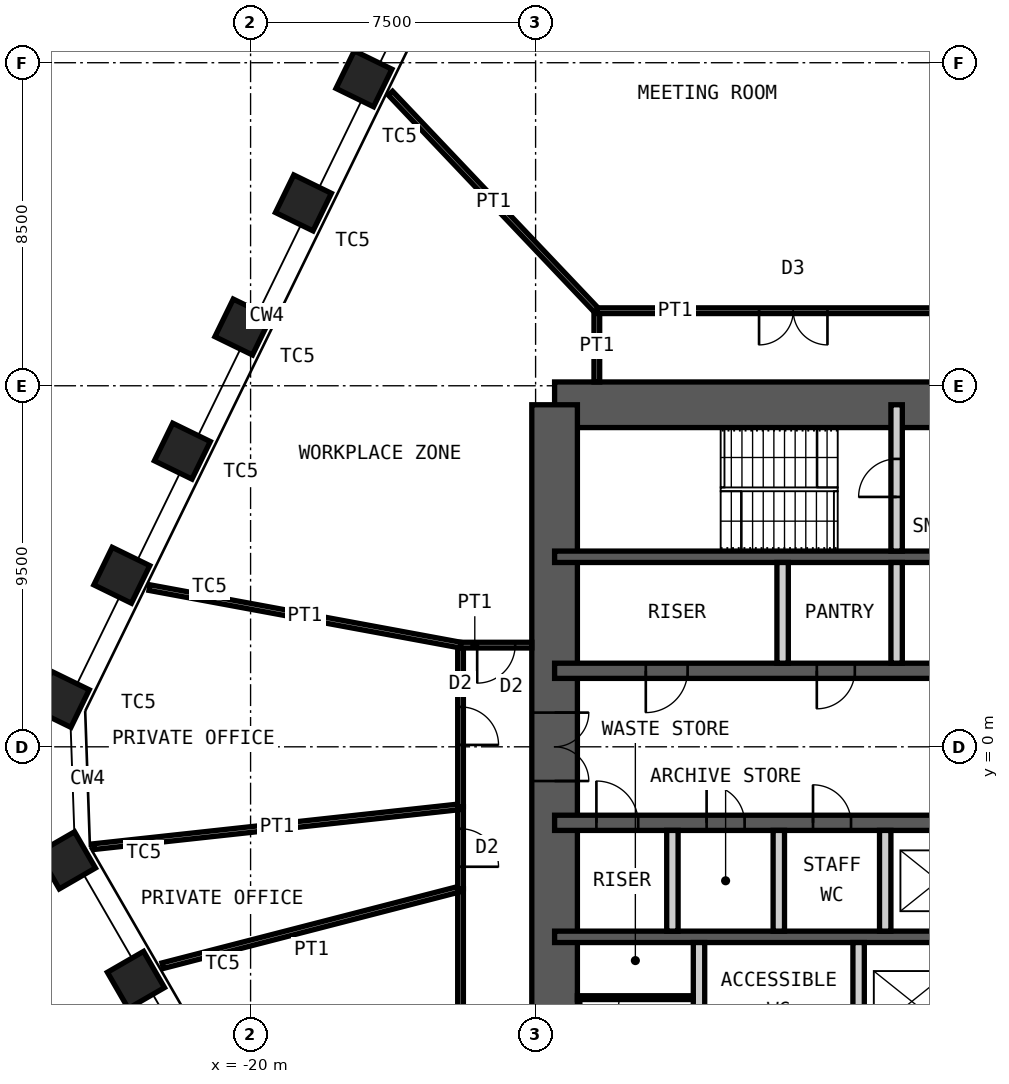
"""IFC4 building model, lengths in metres.
Left out: names, types, materials, properties, quantities, classifications, styles, units other than length and angle.
Written with IfcOpenShell. Run it as: python <this file> out.ifc"""

import sys

from ifc_helpers import new_model, si_unit, direction, frame, frame_2d, origin, origin_2d, place, context, subcontext, project, spatial, rectangle, hollow_rectangle, extrude, element, fill, save


model = new_model("IFC4")
c1 = context("Model", 3, precision=1e-05, world=origin(), true_north=direction((0.0, 1.0)))
c2 = subcontext(c1, "Body", "Model", "MODEL_VIEW")
j1 = project(units=[si_unit("LENGTHUNIT", "METRE"), si_unit("PLANEANGLEUNIT", "RADIAN")], contexts=[c1])
p1 = place(None, origin())
s1 = spatial("IfcSite", under=j1, at=p1, CompositionType="ELEMENT")
p2 = place(p1, origin())
s2 = spatial("IfcBuilding", under=s1, at=p2, CompositionType="ELEMENT")
p3 = place(p2, frame((0.0, 0.0, 214.0)))
s3 = spatial("IfcBuildingStorey", under=s2, at=p3, CompositionType="ELEMENT", Elevation=214.0)
for number, where, z_axis, x_axis in (
    (1, (-23.016, -6.134, 0.0), (0.0, 0.0, 1.0), (0.5, -0.866, 0.0)),
    (2, (-24.833, -2.988, 0.0), (0.0, 0.0, 1.0), (0.5, -0.866, 0.0)),
    (3, (-24.981, 1.248, 0.0), (0.0, 0.0, 1.0), (-0.438, -0.899, 0.0)),
    (4, (-23.388, 4.514, 0.0), (0.0, 0.0, 1.0), (-0.438, -0.899, 0.0)),
    (5, (-21.795, 7.78, 0.0), (0.0, 0.0, 1.0), (-0.438, -0.899, 0.0)),
    (6, (-20.203, 11.045, 0.0), (0.0, 0.0, 1.0), (-0.438, -0.899, 0.0)),
    (7, (-18.61, 14.311, 0.0), (0.0, 0.0, 1.0), (-0.438, -0.899, 0.0)),
    (8, (-17.017, 17.577, 0.0), (0.0, 0.0, 1.0), (-0.438, -0.899, 0.0)),
):
    element("IfcColumn", number, at=place(p3, frame(where, z_axis=z_axis, x_axis=x_axis)), inside=s3, PredefinedType="COLUMN", context=c2, shape_type="SweptSolid", body=[
        extrude(hollow_rectangle(XDim=1.1, YDim=1.1, WallThickness=0.07, at=origin_2d()), origin(), (0.0, 0.0, 1.0), 4.2),
    ])
p4 = place(p3, frame((-12.0, 9.0, 0.0), z_axis=(0.0, 0.0, 1.0), x_axis=(1.0, 0.0, 0.0)))
e9 = element("IfcWall", 9, at=p4, inside=s3, PredefinedType="SHEAR", context=c2, shape_type="SweptSolid", body=[
    extrude(rectangle(XDim=24.0, YDim=1.2, at=frame_2d((12.0, 0.0))), origin(), (0.0, 0.0, 1.0), 4.2),
])
p5 = place(p4, frame((10.4, 0.0, 0.0)))
e10 = element("IfcOpeningElement", 10, at=p5, cuts=e9, PredefinedType="OPENING", context=c2, shape_type="SweptSolid", body=[
    extrude(rectangle(XDim=1.0, YDim=2.1, at=frame_2d((0.5, 1.05))), frame((0.0, 0.61, 0.0), z_axis=(0.0, -1.0, 0.0), x_axis=(1.0, 0.0, 0.0)), (0.0, 0.0, 1.0), 1.22),
])
p6 = place(p4, frame((17.6, 0.0, 0.0)))
e11 = element("IfcOpeningElement", 11, at=p6, cuts=e9, PredefinedType="OPENING", context=c2, shape_type="SweptSolid", body=[
    extrude(rectangle(XDim=0.9, YDim=2.1, at=frame_2d((0.45, 1.05))), frame((0.0, 0.61, 0.0), z_axis=(0.0, -1.0, 0.0), x_axis=(1.0, 0.0, 0.0)), (0.0, 0.0, 1.0), 1.22),
])
p7 = place(p4, frame((21.9, 0.0, 0.0)))
e12 = element("IfcOpeningElement", 12, at=p7, cuts=e9, PredefinedType="OPENING", context=c2, shape_type="SweptSolid", body=[
    extrude(rectangle(XDim=0.9, YDim=2.1, at=frame_2d((0.45, 1.05))), frame((0.0, 0.61, 0.0), z_axis=(0.0, -1.0, 0.0), x_axis=(1.0, 0.0, 0.0)), (0.0, 0.0, 1.0), 1.22),
])
p8 = place(p3, frame((-12.0, -9.0, 0.0), z_axis=(0.0, 0.0, 1.0), x_axis=(0.0, 1.0, 0.0)))
e13 = element("IfcWall", 13, at=p8, inside=s3, PredefinedType="SHEAR", context=c2, shape_type="SweptSolid", body=[
    extrude(rectangle(XDim=18.0, YDim=1.2, at=frame_2d((9.0, 0.0))), origin(), (0.0, 0.0, 1.0), 4.2),
])
p9 = place(p8, frame((8.1, 0.0, 0.0)))
e14 = element("IfcOpeningElement", 14, at=p9, cuts=e13, PredefinedType="OPENING", context=c2, shape_type="SweptSolid", body=[
    extrude(rectangle(XDim=1.8, YDim=2.1, at=frame_2d((0.9, 1.05))), frame((0.0, 0.61, 0.0), z_axis=(0.0, -1.0, 0.0), x_axis=(1.0, 0.0, 0.0)), (0.0, 0.0, 1.0), 1.22),
])
p10 = place(p3, frame((-12.0, 5.0, 0.0), z_axis=(0.0, 0.0, 1.0), x_axis=(1.0, 0.0, 0.0)))
e15 = element("IfcWall", 15, at=p10, inside=s3, PredefinedType="SHEAR", context=c2, shape_type="SweptSolid", body=[
    extrude(rectangle(XDim=24.0, YDim=0.3, at=frame_2d((12.0, 0.0))), origin(), (0.0, 0.0, 1.0), 4.2),
])
p11 = place(p3, frame((-12.0, 2.0, 0.0), z_axis=(0.0, 0.0, 1.0), x_axis=(1.0, 0.0, 0.0)))
e16 = element("IfcWall", 16, at=p11, inside=s3, PredefinedType="SHEAR", context=c2, shape_type="SweptSolid", body=[
    extrude(rectangle(XDim=24.0, YDim=0.4, at=frame_2d((12.0, 0.0))), origin(), (0.0, 0.0, 1.0), 4.2),
])
p12 = place(p11, frame((2.4, 0.0, 0.0)))
e17 = element("IfcOpeningElement", 17, at=p12, cuts=e16, PredefinedType="OPENING", context=c2, shape_type="SweptSolid", body=[
    extrude(rectangle(XDim=1.1, YDim=2.1, at=frame_2d((0.55, 1.05))), frame((0.0, 0.21, 0.0), z_axis=(0.0, -1.0, 0.0), x_axis=(1.0, 0.0, 0.0)), (0.0, 0.0, 1.0), 0.42),
])
p13 = place(p11, frame((22.0, 0.0, 0.0)))
e18 = element("IfcOpeningElement", 18, at=p13, cuts=e16, PredefinedType="OPENING", context=c2, shape_type="SweptSolid", body=[
    extrude(rectangle(XDim=1.1, YDim=2.1, at=frame_2d((0.55, 1.05))), frame((0.0, 0.21, 0.0), z_axis=(0.0, -1.0, 0.0), x_axis=(1.0, 0.0, 0.0)), (0.0, 0.0, 1.0), 0.42),
])
p14 = place(p11, frame((10.15, 0.0, 0.0)))
e19 = element("IfcOpeningElement", 19, at=p14, cuts=e16, PredefinedType="OPENING", context=c2, shape_type="SweptSolid", body=[
    extrude(rectangle(XDim=1.0, YDim=2.1, at=frame_2d((0.5, 1.05))), frame((0.0, 0.21, 0.0), z_axis=(0.0, -1.0, 0.0), x_axis=(1.0, 0.0, 0.0)), (0.0, 0.0, 1.0), 0.42),
])
p15 = place(p11, frame((6.9, 0.0, 0.0)))
e20 = element("IfcOpeningElement", 20, at=p15, cuts=e16, PredefinedType="OPENING", context=c2, shape_type="SweptSolid", body=[
    extrude(rectangle(XDim=1.0, YDim=2.1, at=frame_2d((0.5, 1.05))), frame((0.0, 0.21, 0.0), z_axis=(0.0, -1.0, 0.0), x_axis=(1.0, 0.0, 0.0)), (0.0, 0.0, 1.0), 0.42),
])
p16 = place(p11, frame((13.35, 0.0, 0.0)))
e21 = element("IfcOpeningElement", 21, at=p16, cuts=e16, PredefinedType="OPENING", context=c2, shape_type="SweptSolid", body=[
    extrude(rectangle(XDim=1.1, YDim=2.4, at=frame_2d((0.55, 1.2))), frame((0.0, 0.21, 0.0), z_axis=(0.0, -1.0, 0.0), x_axis=(1.0, 0.0, 0.0)), (0.0, 0.0, 1.0), 0.42),
])
p17 = place(p11, frame((16.15, 0.0, 0.0)))
e22 = element("IfcOpeningElement", 22, at=p17, cuts=e16, PredefinedType="OPENING", context=c2, shape_type="SweptSolid", body=[
    extrude(rectangle(XDim=1.1, YDim=2.4, at=frame_2d((0.55, 1.2))), frame((0.0, 0.21, 0.0), z_axis=(0.0, -1.0, 0.0), x_axis=(1.0, 0.0, 0.0)), (0.0, 0.0, 1.0), 0.42),
])
p18 = place(p11, frame((18.95, 0.0, 0.0)))
e23 = element("IfcOpeningElement", 23, at=p18, cuts=e16, PredefinedType="OPENING", context=c2, shape_type="SweptSolid", body=[
    extrude(rectangle(XDim=1.1, YDim=2.4, at=frame_2d((0.55, 1.2))), frame((0.0, 0.21, 0.0), z_axis=(0.0, -1.0, 0.0), x_axis=(1.0, 0.0, 0.0)), (0.0, 0.0, 1.0), 0.42),
])
p19 = place(p3, frame((-12.0, -2.0, 0.0), z_axis=(0.0, 0.0, 1.0), x_axis=(1.0, 0.0, 0.0)))
e24 = element("IfcWall", 24, at=p19, inside=s3, PredefinedType="SHEAR", context=c2, shape_type="SweptSolid", body=[
    extrude(rectangle(XDim=24.0, YDim=0.4, at=frame_2d((12.0, 0.0))), origin(), (0.0, 0.0, 1.0), 4.2),
])
p20 = place(p19, frame((1.1, 0.0, 0.0)))
e25 = element("IfcOpeningElement", 25, at=p20, cuts=e24, PredefinedType="OPENING", context=c2, shape_type="SweptSolid", body=[
    extrude(rectangle(XDim=1.1, YDim=2.1, at=frame_2d((0.55, 1.05))), frame((0.0, 0.21, 0.0), z_axis=(0.0, -1.0, 0.0), x_axis=(1.0, 0.0, 0.0)), (0.0, 0.0, 1.0), 0.42),
])
p21 = place(p19, frame((13.55, 0.0, 0.0)))
e26 = element("IfcOpeningElement", 26, at=p21, cuts=e24, PredefinedType="OPENING", context=c2, shape_type="SweptSolid", body=[
    extrude(rectangle(XDim=1.1, YDim=2.1, at=frame_2d((0.55, 1.05))), frame((0.0, 0.21, 0.0), z_axis=(0.0, -1.0, 0.0), x_axis=(1.0, 0.0, 0.0)), (0.0, 0.0, 1.0), 0.42),
])
p22 = place(p19, frame((20.7, 0.0, 0.0)))
e27 = element("IfcOpeningElement", 27, at=p22, cuts=e24, PredefinedType="OPENING", context=c2, shape_type="SweptSolid", body=[
    extrude(rectangle(XDim=1.1, YDim=2.1, at=frame_2d((0.55, 1.05))), frame((0.0, 0.21, 0.0), z_axis=(0.0, -1.0, 0.0), x_axis=(1.0, 0.0, 0.0)), (0.0, 0.0, 1.0), 0.42),
])
p23 = place(p19, frame((4.0, 0.0, 0.0)))
e28 = element("IfcOpeningElement", 28, at=p23, cuts=e24, PredefinedType="OPENING", context=c2, shape_type="SweptSolid", body=[
    extrude(rectangle(XDim=1.0, YDim=2.1, at=frame_2d((0.5, 1.05))), frame((0.0, 0.21, 0.0), z_axis=(0.0, -1.0, 0.0), x_axis=(1.0, 0.0, 0.0)), (0.0, 0.0, 1.0), 0.42),
])
p24 = place(p19, frame((6.8, 0.0, 0.0)))
e29 = element("IfcOpeningElement", 29, at=p24, cuts=e24, PredefinedType="OPENING", context=c2, shape_type="SweptSolid", body=[
    extrude(rectangle(XDim=1.0, YDim=2.1, at=frame_2d((0.5, 1.05))), frame((0.0, 0.21, 0.0), z_axis=(0.0, -1.0, 0.0), x_axis=(1.0, 0.0, 0.0)), (0.0, 0.0, 1.0), 0.42),
])
p25 = place(p3, frame((-12.0, -5.0, 0.0), z_axis=(0.0, 0.0, 1.0), x_axis=(1.0, 0.0, 0.0)))
e30 = element("IfcWall", 30, at=p25, inside=s3, PredefinedType="SHEAR", context=c2, shape_type="SweptSolid", body=[
    extrude(rectangle(XDim=24.0, YDim=0.3, at=frame_2d((12.0, 0.0))), origin(), (0.0, 0.0, 1.0), 4.2),
])
p26 = place(p3, frame((-3.0, 5.15, 0.0), z_axis=(0.0, 0.0, 1.0), x_axis=(0.0, 1.0, 0.0)))
e31 = element("IfcWall", 31, at=p26, inside=s3, PredefinedType="PARTITIONING", context=c2, shape_type="SweptSolid", body=[
    extrude(rectangle(XDim=3.85, YDim=0.3, at=frame_2d((1.925, 0.0))), origin(), (0.0, 0.0, 1.0), 3.98),
])
p27 = place(p26, frame((1.425, 0.0, 0.0)))
e32 = element("IfcOpeningElement", 32, at=p27, cuts=e31, PredefinedType="OPENING", context=c2, shape_type="SweptSolid", body=[
    extrude(rectangle(XDim=1.0, YDim=2.1, at=frame_2d((0.5, 1.05))), frame((0.0, 0.16, 0.0), z_axis=(0.0, -1.0, 0.0), x_axis=(1.0, 0.0, 0.0)), (0.0, 0.0, 1.0), 0.32),
])
for number, where, z_axis, x_axis in (
    (33, (-6.0, 2.2, 0.0), (0.0, 0.0, 1.0), (0.0, 1.0, 0.0)),
    (34, (-3.0, 2.2, 0.0), (0.0, 0.0, 1.0), (0.0, 1.0, 0.0)),
    (35, (-8.9, -4.85, 0.0), (0.0, 0.0, 1.0), (0.0, 1.0, 0.0)),
    (36, (-6.1, -4.85, 0.0), (0.0, 0.0, 1.0), (0.0, 1.0, 0.0)),
    (37, (-3.3, -4.85, 0.0), (0.0, 0.0, 1.0), (0.0, 1.0, 0.0)),
):
    element("IfcWall", number, at=place(p3, frame(where, z_axis=z_axis, x_axis=x_axis)), inside=s3, PredefinedType="PARTITIONING", context=c2, shape_type="SweptSolid", body=[
        extrude(rectangle(XDim=2.65, YDim=0.3, at=frame_2d((1.325, 0.0))), origin(), (0.0, 0.0, 1.0), 3.98),
    ])
for number, where, z_axis, x_axis in (
    (38, (-8.2, -9.0, 0.0), (0.0, 0.0, 1.0), (0.0, 1.0, 0.0)),
    (39, (-4.0, -9.0, 0.0), (0.0, 0.0, 1.0), (0.0, 1.0, 0.0)),
):
    element("IfcWall", number, at=place(p3, frame(where, z_axis=z_axis, x_axis=x_axis)), inside=s3, PredefinedType="PARTITIONING", context=c2, shape_type="SweptSolid", body=[
        extrude(rectangle(XDim=3.85, YDim=0.3, at=frame_2d((1.925, 0.0))), origin(), (0.0, 0.0, 1.0), 3.98),
    ])
p28 = place(p3, frame((-11.4, -6.6, 0.0), z_axis=(0.0, 0.0, 1.0), x_axis=(1.0, 0.0, 0.0)))
e40 = element("IfcWall", 40, at=p28, inside=s3, PredefinedType="PARTITIONING", context=c2, shape_type="SweptSolid", body=[
    extrude(rectangle(XDim=3.05, YDim=0.1, at=frame_2d((1.525, 0.0))), origin(), (0.0, 0.0, 1.0), 3.98),
])
p29 = place(p28, frame((0.1, 0.0, 0.0)))
e41 = element("IfcOpeningElement", 41, at=p29, cuts=e40, PredefinedType="OPENING", context=c2, shape_type="SweptSolid", body=[
    extrude(rectangle(XDim=1.0, YDim=2.4, at=frame_2d((0.5, 1.2))), frame((0.0, 0.06, 0.0), z_axis=(0.0, -1.0, 0.0), x_axis=(1.0, 0.0, 0.0)), (0.0, 0.0, 1.0), 0.12),
])
p30 = place(p3, frame((-14.475, -11.475, 0.0), z_axis=(0.0, 0.0, 1.0), x_axis=(0.0, 1.0, 0.0)))
e42 = element("IfcWall", 42, at=p30, inside=s3, PredefinedType="PARTITIONING", context=c2, shape_type="SweptSolid", body=[
    extrude(rectangle(XDim=7.739, YDim=0.15, at=frame_2d((3.87, 0.0))), origin(), (0.0, 0.0, 1.0), 4.03),
])
p31 = place(p3, frame((-22.313, -5.759, 0.0), z_axis=(0.0, 0.0, 1.0), x_axis=(0.968265788926, 0.249922712042, 0.0)))
e43 = element("IfcWall", 43, at=p31, inside=s3, PredefinedType="PARTITIONING", context=c2, shape_type="SweptSolid", body=[
    extrude(rectangle(XDim=8.095, YDim=0.15, at=frame_2d((4.048, 0.0))), origin(), (0.0, 0.0, 1.0), 3.43),
])
p32 = place(p3, frame((-14.475, -3.736, 0.0), z_axis=(0.0, 0.0, 1.0), x_axis=(0.0, 1.0, 0.0)))
e44 = element("IfcWall", 44, at=p32, inside=s3, PredefinedType="PARTITIONING", context=c2, shape_type="SweptSolid", body=[
    extrude(rectangle(XDim=2.16, YDim=0.15, at=frame_2d((1.08, 0.0))), origin(), (0.0, 0.0, 1.0), 4.03),
])
p33 = place(p32, frame((0.58, 0.0, 0.0)))
e45 = element("IfcOpeningElement", 45, at=p33, cuts=e44, PredefinedType="OPENING", context=c2, shape_type="SweptSolid", body=[
    extrude(rectangle(XDim=1.0, YDim=2.4, at=frame_2d((0.5, 1.2))), frame((0.0, 0.085, 0.0), z_axis=(0.0, -1.0, 0.0), x_axis=(1.0, 0.0, 0.0)), (0.0, 0.0, 1.0), 0.17),
])
p34 = place(p3, frame((-24.128, -2.627, 0.0), z_axis=(0.0, 0.0, 1.0), x_axis=(0.994126892449, 0.108220708326, 0.0)))
e46 = element("IfcWall", 46, at=p34, inside=s3, PredefinedType="PARTITIONING", context=c2, shape_type="SweptSolid", body=[
    extrude(rectangle(XDim=9.71, YDim=0.15, at=frame_2d((4.855, 0.0))), origin(), (0.0, 0.0, 1.0), 2.93),
])
p35 = place(p3, frame((-14.475, -1.576, 0.0), z_axis=(0.0, 0.0, 1.0), x_axis=(0.0, 1.0, 0.0)))
e47 = element("IfcWall", 47, at=p35, inside=s3, PredefinedType="PARTITIONING", context=c2, shape_type="SweptSolid", body=[
    extrude(rectangle(XDim=4.252, YDim=0.15, at=frame_2d((2.126, 0.0))), origin(), (0.0, 0.0, 1.0), 4.03),
])
p36 = place(p35, frame((1.626, 0.0, 0.0)))
e48 = element("IfcOpeningElement", 48, at=p36, cuts=e47, PredefinedType="OPENING", context=c2, shape_type="SweptSolid", body=[
    extrude(rectangle(XDim=1.0, YDim=2.4, at=frame_2d((0.5, 1.2))), frame((0.0, 0.085, 0.0), z_axis=(0.0, -1.0, 0.0), x_axis=(1.0, 0.0, 0.0)), (0.0, 0.0, 1.0), 0.17),
])
p37 = place(p3, frame((-22.661, 4.189, 0.0), z_axis=(0.0, 0.0, 1.0), x_axis=(0.983345347199, -0.181746879316, 0.0)))
e49 = element("IfcWall", 49, at=p37, inside=s3, PredefinedType="PARTITIONING", context=c2, shape_type="SweptSolid", body=[
    extrude(rectangle(XDim=8.324, YDim=0.15, at=frame_2d((4.162, 0.0))), origin(), (0.0, 0.0, 1.0), 3.43),
])
p38 = place(p3, frame((-14.475, 2.676, 0.0), z_axis=(0.0, 0.0, 1.0), x_axis=(1.0, 0.0, 0.0)))
e50 = element("IfcWall", 50, at=p38, inside=s3, PredefinedType="PARTITIONING", context=c2, shape_type="SweptSolid", body=[
    extrude(rectangle(XDim=1.875, YDim=0.15, at=frame_2d((0.938, 0.0))), origin(), (0.0, 0.0, 1.0), 3.43),
])
p39 = place(p38, frame((0.438, 0.0, 0.0)))
e51 = element("IfcOpeningElement", 51, at=p39, cuts=e50, PredefinedType="OPENING", context=c2, shape_type="SweptSolid", body=[
    extrude(rectangle(XDim=1.0, YDim=2.4, at=frame_2d((0.5, 1.2))), frame((0.0, 0.085, 0.0), z_axis=(0.0, -1.0, 0.0), x_axis=(1.0, 0.0, 0.0)), (0.0, 0.0, 1.0), 0.17),
])
p40 = place(p3, frame((-10.889, 9.6, 0.0), z_axis=(0.0, 0.0, 1.0), x_axis=(0.0, 1.0, 0.0)))
e52 = element("IfcWall", 52, at=p40, inside=s3, PredefinedType="PARTITIONING", context=c2, shape_type="SweptSolid", body=[
    extrude(rectangle(XDim=1.875, YDim=0.15, at=frame_2d((0.938, 0.0))), origin(), (0.0, 0.0, 1.0), 4.03),
])
p41 = place(p3, frame((-16.319, 17.198, 0.0), z_axis=(0.0, 0.0, 1.0), x_axis=(0.688326413955, -0.725401094466, 0.0)))
e53 = element("IfcWall", 53, at=p41, inside=s3, PredefinedType="PARTITIONING", context=c2, shape_type="SweptSolid", body=[
    extrude(rectangle(XDim=7.889, YDim=0.15, at=frame_2d((3.944, 0.0))), origin(), (0.0, 0.0, 1.0), 4.03),
])
p42 = place(p3, frame((-10.889, 11.475, 0.0), z_axis=(0.0, 0.0, 1.0), x_axis=(1.0, 0.0, 0.0)))
e54 = element("IfcWall", 54, at=p42, inside=s3, PredefinedType="PARTITIONING", context=c2, shape_type="SweptSolid", body=[
    extrude(rectangle(XDim=10.337, YDim=0.15, at=frame_2d((5.169, 0.0))), origin(), (0.0, 0.0, 1.0), 4.03),
])
p43 = place(p42, frame((4.269, 0.0, 0.0)))
e55 = element("IfcOpeningElement", 55, at=p43, cuts=e54, PredefinedType="OPENING", context=c2, shape_type="SweptSolid", body=[
    extrude(rectangle(XDim=1.8, YDim=2.4, at=frame_2d((0.9, 1.2))), frame((0.0, 0.085, 0.0), z_axis=(0.0, -1.0, 0.0), x_axis=(1.0, 0.0, 0.0)), (0.0, 0.0, 1.0), 0.17),
])
p44 = place(p27, origin())
e56 = element("IfcDoor", 56, at=p44, inside=s3, OperationType="SINGLE_SWING_RIGHT", PredefinedType="DOOR", context=c2, shape_type="SweptSolid", body=[
    extrude(rectangle(XDim=1.0, YDim=2.1, at=frame_2d((0.5, 1.05))), frame((0.0, 0.025, 0.0), z_axis=(0.0, -1.0, 0.0), x_axis=(1.0, 0.0, 0.0)), (0.0, 0.0, 1.0), 0.05),
])
fill(e32, e56)
p45 = place(p12, origin())
e57 = element("IfcDoor", 57, at=p45, inside=s3, OperationType="SINGLE_SWING_LEFT", PredefinedType="DOOR", context=c2, shape_type="SweptSolid", body=[
    extrude(rectangle(XDim=1.1, YDim=2.1, at=frame_2d((0.55, 1.05))), frame((0.0, 0.025, 0.0), z_axis=(0.0, -1.0, 0.0), x_axis=(1.0, 0.0, 0.0)), (0.0, 0.0, 1.0), 0.05),
])
fill(e17, e57)
p46 = place(p20, origin())
e58 = element("IfcDoor", 58, at=p46, inside=s3, OperationType="SINGLE_SWING_RIGHT", PredefinedType="DOOR", context=c2, shape_type="SweptSolid", body=[
    extrude(rectangle(XDim=1.1, YDim=2.1, at=frame_2d((0.55, 1.05))), frame((0.0, 0.025, 0.0), z_axis=(0.0, -1.0, 0.0), x_axis=(1.0, 0.0, 0.0)), (0.0, 0.0, 1.0), 0.05),
])
fill(e25, e58)
p47 = place(p9, origin())
e59 = element("IfcDoor", 59, at=p47, inside=s3, OperationType="DOUBLE_DOOR_DOUBLE_SWING", PredefinedType="DOOR", context=c2, shape_type="SweptSolid", body=[
    extrude(rectangle(XDim=1.8, YDim=2.1, at=frame_2d((0.9, 1.05))), frame((0.0, 0.025, 0.0), z_axis=(0.0, -1.0, 0.0), x_axis=(1.0, 0.0, 0.0)), (0.0, 0.0, 1.0), 0.05),
])
fill(e14, e59)
p48 = place(p15, origin())
e60 = element("IfcDoor", 60, at=p48, inside=s3, OperationType="SINGLE_SWING_LEFT", PredefinedType="DOOR", context=c2, shape_type="SweptSolid", body=[
    extrude(rectangle(XDim=1.0, YDim=2.1, at=frame_2d((0.5, 1.05))), frame((0.0, 0.025, 0.0), z_axis=(0.0, -1.0, 0.0), x_axis=(1.0, 0.0, 0.0)), (0.0, 0.0, 1.0), 0.05),
])
fill(e20, e60)
p49 = place(p23, origin())
e61 = element("IfcDoor", 61, at=p49, inside=s3, OperationType="SINGLE_SWING_RIGHT", PredefinedType="DOOR", context=c2, shape_type="SweptSolid", body=[
    extrude(rectangle(XDim=1.0, YDim=2.1, at=frame_2d((0.5, 1.05))), frame((0.0, 0.025, 0.0), z_axis=(0.0, -1.0, 0.0), x_axis=(1.0, 0.0, 0.0)), (0.0, 0.0, 1.0), 0.05),
])
fill(e28, e61)
p50 = place(p24, origin())
e62 = element("IfcDoor", 62, at=p50, inside=s3, OperationType="SINGLE_SWING_RIGHT", PredefinedType="DOOR", context=c2, shape_type="SweptSolid", body=[
    extrude(rectangle(XDim=1.0, YDim=2.1, at=frame_2d((0.5, 1.05))), frame((0.0, 0.025, 0.0), z_axis=(0.0, -1.0, 0.0), x_axis=(1.0, 0.0, 0.0)), (0.0, 0.0, 1.0), 0.05),
])
fill(e29, e62)
p51 = place(p29, origin())
e63 = element("IfcDoor", 63, at=p51, inside=s3, OperationType="SINGLE_SWING_LEFT", PredefinedType="DOOR", context=c2, shape_type="SweptSolid", body=[
    extrude(rectangle(XDim=1.0, YDim=2.4, at=frame_2d((0.5, 1.2))), frame((0.0, 0.025, 0.0), z_axis=(0.0, -1.0, 0.0), x_axis=(1.0, 0.0, 0.0)), (0.0, 0.0, 1.0), 0.05),
])
fill(e41, e63)
p52 = place(p33, origin())
e64 = element("IfcDoor", 64, at=p52, inside=s3, OperationType="SINGLE_SWING_LEFT", PredefinedType="DOOR", context=c2, shape_type="SweptSolid", body=[
    extrude(rectangle(XDim=1.0, YDim=2.4, at=frame_2d((0.5, 1.2))), frame((0.0, 0.025, 0.0), z_axis=(0.0, -1.0, 0.0), x_axis=(1.0, 0.0, 0.0)), (0.0, 0.0, 1.0), 0.05),
])
fill(e45, e64)
p53 = place(p36, origin())
e65 = element("IfcDoor", 65, at=p53, inside=s3, OperationType="SINGLE_SWING_LEFT", PredefinedType="DOOR", context=c2, shape_type="SweptSolid", body=[
    extrude(rectangle(XDim=1.0, YDim=2.4, at=frame_2d((0.5, 1.2))), frame((0.0, 0.025, 0.0), z_axis=(0.0, -1.0, 0.0), x_axis=(1.0, 0.0, 0.0)), (0.0, 0.0, 1.0), 0.05),
])
fill(e48, e65)
p54 = place(p39, origin())
e66 = element("IfcDoor", 66, at=p54, inside=s3, OperationType="SINGLE_SWING_LEFT", PredefinedType="DOOR", context=c2, shape_type="SweptSolid", body=[
    extrude(rectangle(XDim=1.0, YDim=2.4, at=frame_2d((0.5, 1.2))), frame((0.0, 0.025, 0.0), z_axis=(0.0, -1.0, 0.0), x_axis=(1.0, 0.0, 0.0)), (0.0, 0.0, 1.0), 0.05),
])
fill(e51, e66)
p55 = place(p43, origin())
e67 = element("IfcDoor", 67, at=p55, inside=s3, OperationType="DOUBLE_DOOR_DOUBLE_SWING", PredefinedType="DOOR", context=c2, shape_type="SweptSolid", body=[
    extrude(rectangle(XDim=1.8, YDim=2.4, at=frame_2d((0.9, 1.2))), frame((0.0, 0.025, 0.0), z_axis=(0.0, -1.0, 0.0), x_axis=(1.0, 0.0, 0.0)), (0.0, 0.0, 1.0), 0.05),
])
fill(e55, e67)
save(model, sys.argv[1])
